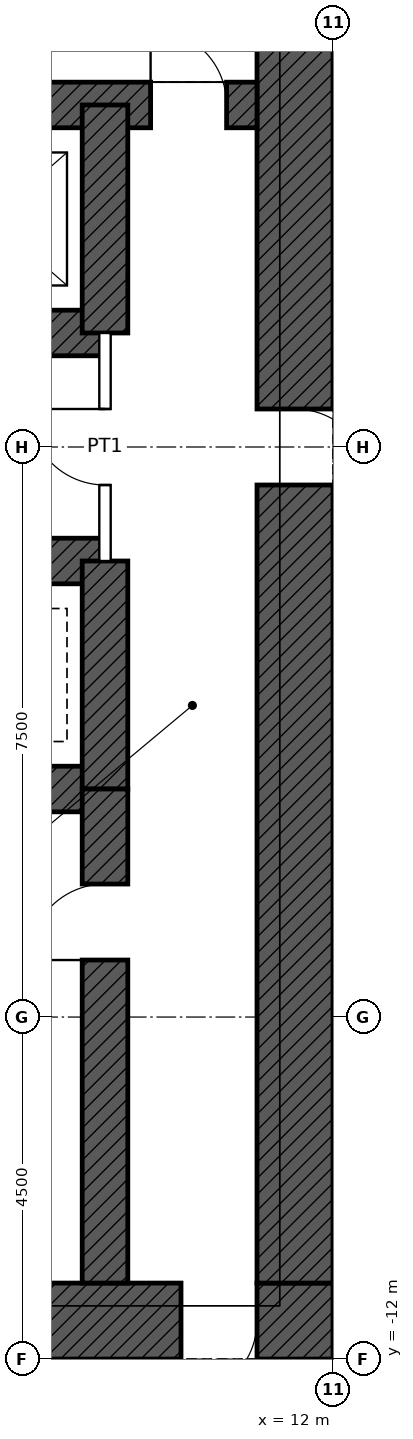
"""IFC4 building model, lengths in metres.
Left out: names, types, materials, properties, quantities, classifications, styles, units other than length and angle.
Written with IfcOpenShell. Run it as: python <this file> out.ifc"""

import sys

from ifc_helpers import new_model, si_unit, direction, frame, frame_2d, origin, place, context, subcontext, project, spatial, rectangle, extrude, element, fill, save


model = new_model("IFC4")
c1 = context("Model", 3, precision=1e-05, world=origin(), true_north=direction((0.0, 1.0)))
c2 = subcontext(c1, "Body", "Model", "MODEL_VIEW")
j1 = project(units=[si_unit("LENGTHUNIT", "METRE"), si_unit("PLANEANGLEUNIT", "RADIAN")], contexts=[c1])
p1 = place(None, origin())
s1 = spatial("IfcSite", under=j1, at=p1, CompositionType="ELEMENT")
p2 = place(p1, origin())
s2 = spatial("IfcBuilding", under=s1, at=p2, CompositionType="ELEMENT")
p3 = place(p2, frame((0.0, 0.0, 18.0)))
s3 = spatial("IfcBuildingStorey", under=s2, at=p3, CompositionType="ELEMENT", Elevation=18.0)
p4 = place(p3, frame((12.0, -11.5, 0.0), z_axis=(0.0, 0.0, 1.0), x_axis=(-1.0, 0.0, 0.0)))
e1 = element("IfcWall", 1, at=p4, inside=s3, PredefinedType="SHEAR", context=c2, shape_type="SweptSolid", body=[
    extrude(rectangle(XDim=24.0, YDim=1.0, at=frame_2d((12.0, 0.0))), origin(), (0.0, 0.0, 1.0), 5.4),
])
p5 = place(p4, frame((11.5, 0.0, 0.0)))
e2 = element("IfcOpeningElement", 2, at=p5, cuts=e1, PredefinedType="OPENING", context=c2, shape_type="SweptSolid", body=[
    extrude(rectangle(XDim=1.0, YDim=2.1, at=frame_2d((0.5, 1.05))), frame((0.0, 0.51, 0.0), z_axis=(0.0, -1.0, 0.0), x_axis=(1.0, 0.0, 0.0)), (0.0, 0.0, 1.0), 1.02),
])
p6 = place(p4, frame((1.0, 0.0, 0.0)))
e3 = element("IfcOpeningElement", 3, at=p6, cuts=e1, PredefinedType="OPENING", context=c2, shape_type="SweptSolid", body=[
    extrude(rectangle(XDim=1.0, YDim=2.4, at=frame_2d((0.5, 1.2))), frame((0.0, 0.51, 0.0), z_axis=(0.0, -1.0, 0.0), x_axis=(1.0, 0.0, 0.0)), (0.0, 0.0, 1.0), 1.02),
])
p7 = place(p3, frame((11.5, 11.0, 0.0), z_axis=(0.0, 0.0, 1.0), x_axis=(0.0, -1.0, 0.0)))
e4 = element("IfcWall", 4, at=p7, inside=s3, PredefinedType="SHEAR", context=c2, shape_type="SweptSolid", body=[
    extrude(rectangle(XDim=22.0, YDim=1.0, at=frame_2d((11.0, 0.0))), origin(), (0.0, 0.0, 1.0), 5.4),
])
p8 = place(p7, frame((10.5, 0.0, 0.0)))
e5 = element("IfcOpeningElement", 5, at=p8, cuts=e4, PredefinedType="OPENING", context=c2, shape_type="SweptSolid", body=[
    extrude(rectangle(XDim=1.0, YDim=2.4, at=frame_2d((0.5, 1.2))), frame((0.0, 0.51, 0.0), z_axis=(0.0, -1.0, 0.0), x_axis=(1.0, 0.0, 0.0)), (0.0, 0.0, 1.0), 1.02),
])
p9 = place(p3, frame((-11.0, 4.5, 0.0), z_axis=(0.0, 0.0, 1.0), x_axis=(1.0, 0.0, 0.0)))
e6 = element("IfcWall", 6, at=p9, inside=s3, PredefinedType="SHEAR", context=c2, shape_type="SweptSolid", body=[
    extrude(rectangle(XDim=22.0, YDim=0.6, at=frame_2d((11.0, 0.0))), origin(), (0.0, 0.0, 1.0), 5.4),
])
p10 = place(p9, frame((0.4, 0.0, 0.0)))
e7 = element("IfcOpeningElement", 7, at=p10, cuts=e6, PredefinedType="OPENING", context=c2, shape_type="SweptSolid", body=[
    extrude(rectangle(XDim=1.0, YDim=2.1, at=frame_2d((0.5, 1.05))), frame((0.0, 0.31, 0.0), z_axis=(0.0, -1.0, 0.0), x_axis=(1.0, 0.0, 0.0)), (0.0, 0.0, 1.0), 0.62),
])
p11 = place(p9, frame((20.6, 0.0, 0.0)))
e8 = element("IfcOpeningElement", 8, at=p11, cuts=e6, PredefinedType="OPENING", context=c2, shape_type="SweptSolid", body=[
    extrude(rectangle(XDim=1.0, YDim=2.1, at=frame_2d((0.5, 1.05))), frame((0.0, 0.31, 0.0), z_axis=(0.0, -1.0, 0.0), x_axis=(1.0, 0.0, 0.0)), (0.0, 0.0, 1.0), 0.62),
])
p12 = place(p3, frame((-9.0, 1.5, 0.0), z_axis=(0.0, 0.0, 1.0), x_axis=(1.0, 0.0, 0.0)))
e9 = element("IfcWall", 9, at=p12, inside=s3, PredefinedType="SHEAR", context=c2, shape_type="SweptSolid", body=[
    extrude(rectangle(XDim=18.0, YDim=0.6, at=frame_2d((9.0, 0.0))), origin(), (0.0, 0.0, 1.0), 5.4),
])
p13 = place(p12, frame((9.95, 0.0, 0.0)))
e10 = element("IfcOpeningElement", 10, at=p13, cuts=e9, PredefinedType="OPENING", context=c2, shape_type="SweptSolid", body=[
    extrude(rectangle(XDim=1.1, YDim=2.1, at=frame_2d((0.55, 1.05))), frame((0.0, 0.31, 0.0), z_axis=(0.0, -1.0, 0.0), x_axis=(1.0, 0.0, 0.0)), (0.0, 0.0, 1.0), 0.62),
])
p14 = place(p12, frame((12.95, 0.0, 0.0)))
e11 = element("IfcOpeningElement", 11, at=p14, cuts=e9, PredefinedType="OPENING", context=c2, shape_type="SweptSolid", body=[
    extrude(rectangle(XDim=1.1, YDim=2.1, at=frame_2d((0.55, 1.05))), frame((0.0, 0.31, 0.0), z_axis=(0.0, -1.0, 0.0), x_axis=(1.0, 0.0, 0.0)), (0.0, 0.0, 1.0), 0.62),
])
p15 = place(p12, frame((15.95, 0.0, 0.0)))
e12 = element("IfcOpeningElement", 12, at=p15, cuts=e9, PredefinedType="OPENING", context=c2, shape_type="SweptSolid", body=[
    extrude(rectangle(XDim=1.1, YDim=2.1, at=frame_2d((0.55, 1.05))), frame((0.0, 0.31, 0.0), z_axis=(0.0, -1.0, 0.0), x_axis=(1.0, 0.0, 0.0)), (0.0, 0.0, 1.0), 0.62),
])
p16 = place(p12, frame((0.95, 0.0, 0.0)))
e13 = element("IfcOpeningElement", 13, at=p16, cuts=e9, PredefinedType="OPENING", context=c2, shape_type="SweptSolid", body=[
    extrude(rectangle(XDim=1.1, YDim=2.1, at=frame_2d((0.55, 1.05))), frame((0.0, 0.31, 0.0), z_axis=(0.0, -1.0, 0.0), x_axis=(1.0, 0.0, 0.0)), (0.0, 0.0, 1.0), 0.62),
])
p17 = place(p12, frame((3.95, 0.0, 0.0)))
e14 = element("IfcOpeningElement", 14, at=p17, cuts=e9, PredefinedType="OPENING", context=c2, shape_type="SweptSolid", body=[
    extrude(rectangle(XDim=1.1, YDim=2.1, at=frame_2d((0.55, 1.05))), frame((0.0, 0.31, 0.0), z_axis=(0.0, -1.0, 0.0), x_axis=(1.0, 0.0, 0.0)), (0.0, 0.0, 1.0), 0.62),
])
p18 = place(p12, frame((6.95, 0.0, 0.0)))
e15 = element("IfcOpeningElement", 15, at=p18, cuts=e9, PredefinedType="OPENING", context=c2, shape_type="SweptSolid", body=[
    extrude(rectangle(XDim=1.1, YDim=2.1, at=frame_2d((0.55, 1.05))), frame((0.0, 0.31, 0.0), z_axis=(0.0, -1.0, 0.0), x_axis=(1.0, 0.0, 0.0)), (0.0, 0.0, 1.0), 0.62),
])
for number, where, z_axis, x_axis in (
    (16, (-9.0, -1.5, 0.0), (0.0, 0.0, 1.0), (1.0, 0.0, 0.0)),
    (17, (-9.0, -4.5, 0.0), (0.0, 0.0, 1.0), (1.0, 0.0, 0.0)),
):
    element("IfcWall", number, at=place(p3, frame(where, z_axis=z_axis, x_axis=x_axis)), inside=s3, PredefinedType="SHEAR", context=c2, shape_type="SweptSolid", body=[
        extrude(rectangle(XDim=18.0, YDim=0.6, at=frame_2d((9.0, 0.0))), origin(), (0.0, 0.0, 1.0), 5.4),
    ])
for number, where, z_axis, x_axis in (
    (18, (9.0, 1.5, 0.0), (0.0, 0.0, 1.0), (0.0, 1.0, 0.0)),
    (19, (9.0, -4.5, 0.0), (0.0, 0.0, 1.0), (0.0, 1.0, 0.0)),
):
    element("IfcWall", number, at=place(p3, frame(where, z_axis=z_axis, x_axis=x_axis)), inside=s3, PredefinedType="SHEAR", context=c2, shape_type="SweptSolid", body=[
        extrude(rectangle(XDim=3.0, YDim=0.6, at=frame_2d((1.5, 0.0))), origin(), (0.0, 0.0, 1.0), 5.4),
    ])
p19 = place(p3, frame((9.0, -11.0, 0.0), z_axis=(0.0, 0.0, 1.0), x_axis=(0.0, 1.0, 0.0)))
e20 = element("IfcWall", 20, at=p19, inside=s3, PredefinedType="SHEAR", context=c2, shape_type="SweptSolid", body=[
    extrude(rectangle(XDim=6.5, YDim=0.6, at=frame_2d((3.25, 0.0))), origin(), (0.0, 0.0, 1.0), 5.4),
])
p20 = place(p19, frame((4.25, 0.0, 0.0)))
e21 = element("IfcOpeningElement", 21, at=p20, cuts=e20, PredefinedType="OPENING", context=c2, shape_type="SweptSolid", body=[
    extrude(rectangle(XDim=1.0, YDim=2.1, at=frame_2d((0.5, 1.05))), frame((0.0, 0.31, 0.0), z_axis=(0.0, -1.0, 0.0), x_axis=(1.0, 0.0, 0.0)), (0.0, 0.0, 1.0), 0.62),
])
p21 = place(p3, frame((9.0, -1.5, 0.0), z_axis=(0.0, 0.0, 1.0), x_axis=(0.0, 1.0, 0.0)))
e22 = element("IfcWall", 22, at=p21, inside=s3, PredefinedType="PARTITIONING", context=c2, shape_type="SweptSolid", body=[
    extrude(rectangle(XDim=3.0, YDim=0.15, at=frame_2d((1.5, 0.0))), origin(), (0.0, 0.0, 1.0), 5.15),
])
p22 = place(p21, frame((1.0, 0.0, 0.0)))
e23 = element("IfcOpeningElement", 23, at=p22, cuts=e22, PredefinedType="OPENING", context=c2, shape_type="SweptSolid", body=[
    extrude(rectangle(XDim=1.0, YDim=2.4, at=frame_2d((0.5, 1.2))), frame((0.0, 0.085, 0.0), z_axis=(0.0, -1.0, 0.0), x_axis=(1.0, 0.0, 0.0)), (0.0, 0.0, 1.0), 0.17),
])
p23 = place(p11, origin())
e24 = element("IfcDoor", 24, at=p23, inside=s3, OperationType="SINGLE_SWING_LEFT", PredefinedType="DOOR", context=c2, shape_type="SweptSolid", body=[
    extrude(rectangle(XDim=1.0, YDim=2.1, at=frame_2d((0.5, 1.05))), frame((0.0, 0.025, 0.0), z_axis=(0.0, -1.0, 0.0), x_axis=(1.0, 0.0, 0.0)), (0.0, 0.0, 1.0), 0.05),
])
fill(e8, e24)
p24 = place(p8, origin())
e25 = element("IfcDoor", 25, at=p24, inside=s3, OperationType="SINGLE_SWING_RIGHT", PredefinedType="DOOR", context=c2, shape_type="SweptSolid", body=[
    extrude(rectangle(XDim=1.0, YDim=2.4, at=frame_2d((0.5, 1.2))), frame((0.0, 0.485, 0.0), z_axis=(0.0, -1.0, 0.0), x_axis=(1.0, 0.0, 0.0)), (0.0, 0.0, 1.0), 0.05),
])
fill(e5, e25)
p25 = place(p6, origin())
e26 = element("IfcDoor", 26, at=p25, inside=s3, OperationType="SINGLE_SWING_RIGHT", PredefinedType="DOOR", context=c2, shape_type="SweptSolid", body=[
    extrude(rectangle(XDim=1.0, YDim=2.4, at=frame_2d((0.5, 1.2))), frame((0.0, 0.485, 0.0), z_axis=(0.0, -1.0, 0.0), x_axis=(1.0, 0.0, 0.0)), (0.0, 0.0, 1.0), 0.05),
])
fill(e3, e26)
p26 = place(p20, origin())
e27 = element("IfcDoor", 27, at=p26, inside=s3, OperationType="SINGLE_SWING_LEFT", PredefinedType="DOOR", context=c2, shape_type="SweptSolid", body=[
    extrude(rectangle(XDim=1.0, YDim=2.1, at=frame_2d((0.5, 1.05))), frame((0.0, 0.025, 0.0), z_axis=(0.0, -1.0, 0.0), x_axis=(1.0, 0.0, 0.0)), (0.0, 0.0, 1.0), 0.05),
])
fill(e21, e27)
p27 = place(p22, origin())
e28 = element("IfcDoor", 28, at=p27, inside=s3, OperationType="SINGLE_SWING_RIGHT", PredefinedType="DOOR", context=c2, shape_type="SweptSolid", body=[
    extrude(rectangle(XDim=1.0, YDim=2.4, at=frame_2d((0.5, 1.2))), frame((0.0, 0.025, 0.0), z_axis=(0.0, -1.0, 0.0), x_axis=(1.0, 0.0, 0.0)), (0.0, 0.0, 1.0), 0.05),
])
fill(e23, e28)
save(model, sys.argv[1])
